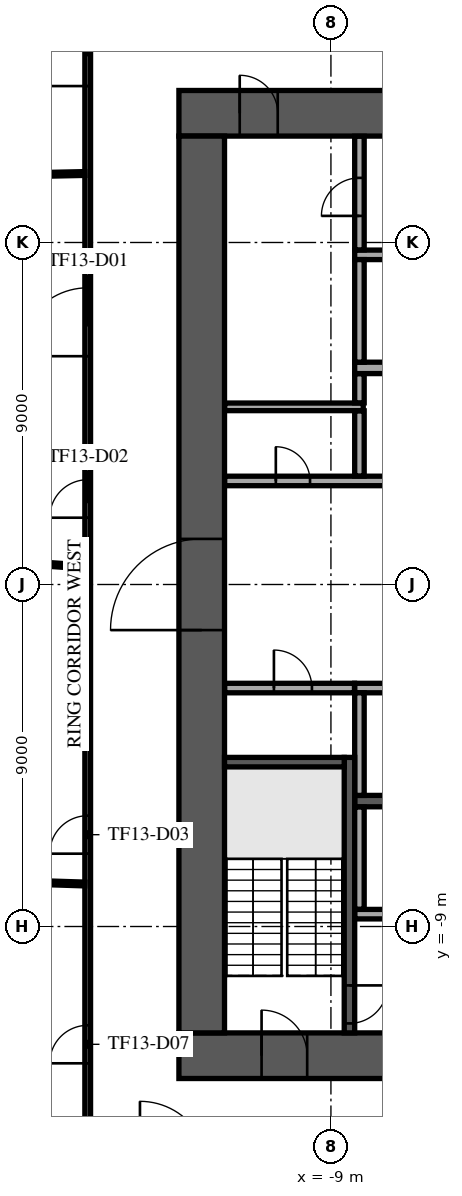
"""IFC4 building model, lengths in metres.
Left out: names, types, materials, properties, quantities, classifications, styles, units other than length and angle.
Written with IfcOpenShell. Run it as: python <this file> out.ifc"""

import sys

from ifc_helpers import new_model, si_unit, direction, frame, frame_2d, origin, place, context, subcontext, project, spatial, rectangle, extrude, element, fill, save


model = new_model("IFC4")
c1 = context("Model", 3, precision=1e-05, world=origin(), true_north=direction((0.0, 1.0)))
c2 = subcontext(c1, "Body", "Model", "MODEL_VIEW")
j1 = project(units=[si_unit("LENGTHUNIT", "METRE"), si_unit("PLANEANGLEUNIT", "RADIAN")], contexts=[c1])
p1 = place(None, origin())
s1 = spatial("IfcSite", under=j1, at=p1, CompositionType="ELEMENT")
p2 = place(p1, origin())
s2 = spatial("IfcBuilding", under=s1, at=p2, CompositionType="ELEMENT")
p3 = place(p2, frame((0.0, 0.0, 59.7)))
s3 = spatial("IfcBuildingStorey", under=s2, at=p3, CompositionType="ELEMENT", Elevation=59.7)
p4 = place(p3, frame((-13.0, 12.4, 0.0), z_axis=(0.0, 0.0, 1.0), x_axis=(1.0, 0.0, 0.0)))
e1 = element("IfcWall", 1, at=p4, inside=s3, PredefinedType="SHEAR", context=c2, shape_type="SweptSolid", body=[
    extrude(rectangle(XDim=26.0, YDim=1.2, at=frame_2d((13.0, 0.0))), origin(), (0.0, 0.0, 1.0), 3.75),
])
p5 = place(p4, frame((11.8, 0.0, 0.0)))
e2 = element("IfcOpeningElement", 2, at=p5, cuts=e1, PredefinedType="OPENING", context=c2, shape_type="SweptSolid", body=[
    extrude(rectangle(XDim=2.4, YDim=2.4, at=frame_2d((1.2, 1.2))), frame((0.0, 0.61, 0.0), z_axis=(0.0, -1.0, 0.0), x_axis=(1.0, 0.0, 0.0)), (0.0, 0.0, 1.0), 1.22),
])
p6 = place(p4, frame((22.625, 0.0, 0.0)))
e3 = element("IfcOpeningElement", 3, at=p6, cuts=e1, PredefinedType="OPENING", context=c2, shape_type="SweptSolid", body=[
    extrude(rectangle(XDim=1.2, YDim=2.1, at=frame_2d((0.6, 1.05))), frame((0.0, 0.61, 0.0), z_axis=(0.0, -1.0, 0.0), x_axis=(1.0, 0.0, 0.0)), (0.0, 0.0, 1.0), 1.22),
])
p7 = place(p4, frame((1.6, 0.0, 0.0)))
e4 = element("IfcOpeningElement", 4, at=p7, cuts=e1, PredefinedType="OPENING", context=c2, shape_type="SweptSolid", body=[
    extrude(rectangle(XDim=1.0, YDim=2.1, at=frame_2d((0.5, 1.05))), frame((0.0, 0.61, 0.0), z_axis=(0.0, -1.0, 0.0), x_axis=(1.0, 0.0, 0.0)), (0.0, 0.0, 1.0), 1.22),
])
p8 = place(p3, frame((-13.0, -12.4, 0.0), z_axis=(0.0, 0.0, 1.0), x_axis=(1.0, 0.0, 0.0)))
e5 = element("IfcWall", 5, at=p8, inside=s3, PredefinedType="SHEAR", context=c2, shape_type="SweptSolid", body=[
    extrude(rectangle(XDim=26.0, YDim=1.2, at=frame_2d((13.0, 0.0))), origin(), (0.0, 0.0, 1.0), 3.75),
])
p9 = place(p8, frame((7.9, 0.0, 0.0)))
e6 = element("IfcOpeningElement", 6, at=p9, cuts=e5, PredefinedType="OPENING", context=c2, shape_type="SweptSolid", body=[
    extrude(rectangle(XDim=2.0, YDim=2.1, at=frame_2d((1.0, 1.05))), frame((0.0, 0.61, 0.0), z_axis=(0.0, -1.0, 0.0), x_axis=(1.0, 0.0, 0.0)), (0.0, 0.0, 1.0), 1.22),
])
p10 = place(p8, frame((18.025, 0.0, 0.0)))
e7 = element("IfcOpeningElement", 7, at=p10, cuts=e5, PredefinedType="OPENING", context=c2, shape_type="SweptSolid", body=[
    extrude(rectangle(XDim=1.2, YDim=2.1, at=frame_2d((0.6, 1.05))), frame((0.0, 0.61, 0.0), z_axis=(0.0, -1.0, 0.0), x_axis=(1.0, 0.0, 0.0)), (0.0, 0.0, 1.0), 1.22),
])
p11 = place(p8, frame((2.175, 0.0, 0.0)))
e8 = element("IfcOpeningElement", 8, at=p11, cuts=e5, PredefinedType="OPENING", context=c2, shape_type="SweptSolid", body=[
    extrude(rectangle(XDim=1.2, YDim=2.1, at=frame_2d((0.6, 1.05))), frame((0.0, 0.61, 0.0), z_axis=(0.0, -1.0, 0.0), x_axis=(1.0, 0.0, 0.0)), (0.0, 0.0, 1.0), 1.22),
])
p12 = place(p8, frame((22.625, 0.0, 0.0)))
e9 = element("IfcOpeningElement", 9, at=p12, cuts=e5, PredefinedType="OPENING", context=c2, shape_type="SweptSolid", body=[
    extrude(rectangle(XDim=1.2, YDim=2.1, at=frame_2d((0.6, 1.05))), frame((0.0, 0.61, 0.0), z_axis=(0.0, -1.0, 0.0), x_axis=(1.0, 0.0, 0.0)), (0.0, 0.0, 1.0), 1.22),
])
p13 = place(p3, frame((-12.4, -11.8, 0.0), z_axis=(0.0, 0.0, 1.0), x_axis=(0.0, 1.0, 0.0)))
e10 = element("IfcWall", 10, at=p13, inside=s3, PredefinedType="SHEAR", context=c2, shape_type="SweptSolid", body=[
    extrude(rectangle(XDim=23.6, YDim=1.2, at=frame_2d((11.8, 0.0))), origin(), (0.0, 0.0, 1.0), 3.75),
])
p14 = place(p13, frame((10.6, 0.0, 0.0)))
e11 = element("IfcOpeningElement", 11, at=p14, cuts=e10, PredefinedType="OPENING", context=c2, shape_type="SweptSolid", body=[
    extrude(rectangle(XDim=2.4, YDim=2.4, at=frame_2d((1.2, 1.2))), frame((0.0, 0.61, 0.0), z_axis=(0.0, -1.0, 0.0), x_axis=(1.0, 0.0, 0.0)), (0.0, 0.0, 1.0), 1.22),
])
for number, where, z_axis, x_axis in (
    (12, (-8.375, 5.7, 0.0), (0.0, 0.0, 1.0), (1.0, 0.0, 0.0)),
    (13, (-8.375, -5.7, 0.0), (0.0, 0.0, 1.0), (1.0, 0.0, 0.0)),
):
    element("IfcWall", number, at=place(p3, frame(where, z_axis=z_axis, x_axis=x_axis)), inside=s3, PredefinedType="SOLIDWALL", context=c2, shape_type="SweptSolid", body=[
        extrude(rectangle(XDim=16.75, YDim=0.3, at=frame_2d((8.375, 0.0))), origin(), (0.0, 0.0, 1.0), 3.75),
    ])
p15 = place(p3, frame((-8.375, 8.675, 0.0), z_axis=(0.0, 0.0, 1.0), x_axis=(1.0, 0.0, 0.0)))
e14 = element("IfcWall", 14, at=p15, inside=s3, PredefinedType="SOLIDWALL", context=c2, shape_type="SweptSolid", body=[
    extrude(rectangle(XDim=16.75, YDim=0.25, at=frame_2d((8.375, 0.0))), origin(), (0.0, 0.0, 1.0), 3.75),
])
p16 = place(p15, frame((0.9, 0.0, 0.0)))
e15 = element("IfcOpeningElement", 15, at=p16, cuts=e14, PredefinedType="OPENING", context=c2, shape_type="SweptSolid", body=[
    extrude(rectangle(XDim=1.2, YDim=2.1, at=frame_2d((0.6, 1.05))), frame((0.0, 0.135, 0.0), z_axis=(0.0, -1.0, 0.0), x_axis=(1.0, 0.0, 0.0)), (0.0, 0.0, 1.0), 0.27),
])
p17 = place(p15, frame((3.65, 0.0, 0.0)))
e16 = element("IfcOpeningElement", 16, at=p17, cuts=e14, PredefinedType="OPENING", context=c2, shape_type="SweptSolid", body=[
    extrude(rectangle(XDim=1.2, YDim=2.1, at=frame_2d((0.6, 1.05))), frame((0.0, 0.135, 0.0), z_axis=(0.0, -1.0, 0.0), x_axis=(1.0, 0.0, 0.0)), (0.0, 0.0, 1.0), 0.27),
])
p18 = place(p15, frame((6.4, 0.0, 0.0)))
e17 = element("IfcOpeningElement", 17, at=p18, cuts=e14, PredefinedType="OPENING", context=c2, shape_type="SweptSolid", body=[
    extrude(rectangle(XDim=1.2, YDim=2.1, at=frame_2d((0.6, 1.05))), frame((0.0, 0.135, 0.0), z_axis=(0.0, -1.0, 0.0), x_axis=(1.0, 0.0, 0.0)), (0.0, 0.0, 1.0), 0.27),
])
p19 = place(p15, frame((9.15, 0.0, 0.0)))
e18 = element("IfcOpeningElement", 18, at=p19, cuts=e14, PredefinedType="OPENING", context=c2, shape_type="SweptSolid", body=[
    extrude(rectangle(XDim=1.2, YDim=2.1, at=frame_2d((0.6, 1.05))), frame((0.0, 0.135, 0.0), z_axis=(0.0, -1.0, 0.0), x_axis=(1.0, 0.0, 0.0)), (0.0, 0.0, 1.0), 0.27),
])
p20 = place(p15, frame((11.9, 0.0, 0.0)))
e19 = element("IfcOpeningElement", 19, at=p20, cuts=e14, PredefinedType="OPENING", context=c2, shape_type="SweptSolid", body=[
    extrude(rectangle(XDim=1.2, YDim=2.1, at=frame_2d((0.6, 1.05))), frame((0.0, 0.135, 0.0), z_axis=(0.0, -1.0, 0.0), x_axis=(1.0, 0.0, 0.0)), (0.0, 0.0, 1.0), 0.27),
])
p21 = place(p15, frame((14.65, 0.0, 0.0)))
e20 = element("IfcOpeningElement", 20, at=p21, cuts=e14, PredefinedType="OPENING", context=c2, shape_type="SweptSolid", body=[
    extrude(rectangle(XDim=1.2, YDim=2.1, at=frame_2d((0.6, 1.05))), frame((0.0, 0.135, 0.0), z_axis=(0.0, -1.0, 0.0), x_axis=(1.0, 0.0, 0.0)), (0.0, 0.0, 1.0), 0.27),
])
p22 = place(p3, frame((-8.25, 5.85, 0.0), z_axis=(0.0, 0.0, 1.0), x_axis=(0.0, 1.0, 0.0)))
e21 = element("IfcWall", 21, at=p22, inside=s3, PredefinedType="SOLIDWALL", context=c2, shape_type="SweptSolid", body=[
    extrude(rectangle(XDim=2.7, YDim=0.25, at=frame_2d((1.35, 0.0))), origin(), (0.0, 0.0, 1.0), 3.75),
])
p23 = place(p3, frame((-8.375, -2.725, 0.0), z_axis=(0.0, 0.0, 1.0), x_axis=(1.0, 0.0, 0.0)))
e22 = element("IfcWall", 22, at=p23, inside=s3, PredefinedType="SOLIDWALL", context=c2, shape_type="SweptSolid", body=[
    extrude(rectangle(XDim=14.0, YDim=0.25, at=frame_2d((7.0, 0.0))), origin(), (0.0, 0.0, 1.0), 3.75),
])
p24 = place(p3, frame((-8.25, -5.55, 0.0), z_axis=(0.0, 0.0, 1.0), x_axis=(0.0, 1.0, 0.0)))
e23 = element("IfcWall", 23, at=p24, inside=s3, PredefinedType="SOLIDWALL", context=c2, shape_type="SweptSolid", body=[
    extrude(rectangle(XDim=2.7, YDim=0.25, at=frame_2d((1.35, 0.0))), origin(), (0.0, 0.0, 1.0), 3.75),
])
p25 = place(p3, frame((-8.512, -4.55, 0.0), z_axis=(0.0, 0.0, 1.0), x_axis=(0.0, -1.0, 0.0)))
e24 = element("IfcWall", 24, at=p25, inside=s3, PredefinedType="SOLIDWALL", context=c2, shape_type="SweptSolid", body=[
    extrude(rectangle(XDim=7.25, YDim=0.275, at=frame_2d((3.625, 0.0))), origin(), (0.0, 0.0, 1.0), 3.75),
])
p26 = place(p25, frame((6.0, 0.0, 0.0)))
e25 = element("IfcOpeningElement", 25, at=p26, cuts=e24, PredefinedType="OPENING", context=c2, shape_type="SweptSolid", body=[
    extrude(rectangle(XDim=1.0, YDim=2.1, at=frame_2d((0.5, 1.05))), frame((0.0, 0.147, 0.0), z_axis=(0.0, -1.0, 0.0), x_axis=(1.0, 0.0, 0.0)), (0.0, 0.0, 1.0), 0.295),
])
p27 = place(p3, frame((-8.65, -4.675, 0.0), z_axis=(0.0, 0.0, 1.0), x_axis=(-1.0, 0.0, 0.0)))
e26 = element("IfcWall", 26, at=p27, inside=s3, PredefinedType="SOLIDWALL", context=c2, shape_type="SweptSolid", body=[
    extrude(rectangle(XDim=3.15, YDim=0.25, at=frame_2d((1.575, 0.0))), origin(), (0.0, 0.0, 1.0), 3.75),
])
p28 = place(p3, frame((-8.37, -8.675, 0.0), z_axis=(0.0, 0.0, 1.0), x_axis=(1.0, 0.0, 0.0)))
e27 = element("IfcWall", 27, at=p28, inside=s3, PredefinedType="PARTITIONING", context=c2, shape_type="SweptSolid", body=[
    extrude(rectangle(XDim=5.49, YDim=0.25, at=frame_2d((2.745, 0.0))), origin(), (0.0, 0.0, 1.0), 3.75),
])
p29 = place(p28, frame((0.995, 0.0, 0.0)))
e28 = element("IfcOpeningElement", 28, at=p29, cuts=e27, PredefinedType="OPENING", context=c2, shape_type="SweptSolid", body=[
    extrude(rectangle(XDim=1.0, YDim=2.1, at=frame_2d((0.5, 1.05))), frame((0.0, 0.135, 0.0), z_axis=(0.0, -1.0, 0.0), x_axis=(1.0, 0.0, 0.0)), (0.0, 0.0, 1.0), 0.27),
])
p30 = place(p28, frame((3.745, 0.0, 0.0)))
e29 = element("IfcOpeningElement", 29, at=p30, cuts=e27, PredefinedType="OPENING", context=c2, shape_type="SweptSolid", body=[
    extrude(rectangle(XDim=1.0, YDim=2.1, at=frame_2d((0.5, 1.05))), frame((0.0, 0.135, 0.0), z_axis=(0.0, -1.0, 0.0), x_axis=(1.0, 0.0, 0.0)), (0.0, 0.0, 1.0), 0.27),
])
p31 = place(p3, frame((-8.25, -8.545, 0.0), z_axis=(0.0, 0.0, 1.0), x_axis=(0.0, 1.0, 0.0)))
e30 = element("IfcWall", 30, at=p31, inside=s3, PredefinedType="PARTITIONING", context=c2, shape_type="SweptSolid", body=[
    extrude(rectangle(XDim=2.69, YDim=0.25, at=frame_2d((1.345, 0.0))), origin(), (0.0, 0.0, 1.0), 3.75),
])
p32 = place(p3, frame((-11.795, -2.725, 0.0), z_axis=(0.0, 0.0, 1.0), x_axis=(1.0, 0.0, 0.0)))
e31 = element("IfcWall", 31, at=p32, inside=s3, PredefinedType="PARTITIONING", context=c2, shape_type="SweptSolid", body=[
    extrude(rectangle(XDim=3.415, YDim=0.25, at=frame_2d((1.708, 0.0))), origin(), (0.0, 0.0, 1.0), 3.75),
])
p33 = place(p32, frame((1.295, 0.0, 0.0)))
e32 = element("IfcOpeningElement", 32, at=p33, cuts=e31, PredefinedType="OPENING", context=c2, shape_type="SweptSolid", body=[
    extrude(rectangle(XDim=1.0, YDim=2.1, at=frame_2d((0.5, 1.05))), frame((0.0, 0.135, 0.0), z_axis=(0.0, -1.0, 0.0), x_axis=(1.0, 0.0, 0.0)), (0.0, 0.0, 1.0), 0.27),
])
p34 = place(p3, frame((-11.795, 2.725, 0.0), z_axis=(0.0, 0.0, 1.0), x_axis=(1.0, 0.0, 0.0)))
e33 = element("IfcWall", 33, at=p34, inside=s3, PredefinedType="PARTITIONING", context=c2, shape_type="SweptSolid", body=[
    extrude(rectangle(XDim=23.59, YDim=0.25, at=frame_2d((11.795, 0.0))), origin(), (0.0, 0.0, 1.0), 3.75),
])
p35 = place(p34, frame((21.345, 0.0, 0.0)))
e34 = element("IfcOpeningElement", 34, at=p35, cuts=e33, PredefinedType="OPENING", context=c2, shape_type="SweptSolid", body=[
    extrude(rectangle(XDim=0.9, YDim=2.1, at=frame_2d((0.45, 1.05))), frame((0.0, 0.135, 0.0), z_axis=(0.0, -1.0, 0.0), x_axis=(1.0, 0.0, 0.0)), (0.0, 0.0, 1.0), 0.27),
])
p36 = place(p34, frame((1.345, 0.0, 0.0)))
e35 = element("IfcOpeningElement", 35, at=p36, cuts=e33, PredefinedType="OPENING", context=c2, shape_type="SweptSolid", body=[
    extrude(rectangle(XDim=0.9, YDim=2.1, at=frame_2d((0.45, 1.05))), frame((0.0, 0.135, 0.0), z_axis=(0.0, -1.0, 0.0), x_axis=(1.0, 0.0, 0.0)), (0.0, 0.0, 1.0), 0.27),
])
p37 = place(p34, frame((4.32, 0.0, 0.0)))
e36 = element("IfcOpeningElement", 36, at=p37, cuts=e33, PredefinedType="OPENING", context=c2, shape_type="SweptSolid", body=[
    extrude(rectangle(XDim=1.2, YDim=2.1, at=frame_2d((0.6, 1.05))), frame((0.0, 0.135, 0.0), z_axis=(0.0, -1.0, 0.0), x_axis=(1.0, 0.0, 0.0)), (0.0, 0.0, 1.0), 0.27),
])
p38 = place(p34, frame((15.42, 0.0, 0.0)))
e37 = element("IfcOpeningElement", 37, at=p38, cuts=e33, PredefinedType="OPENING", context=c2, shape_type="SweptSolid", body=[
    extrude(rectangle(XDim=1.0, YDim=2.1, at=frame_2d((0.5, 1.05))), frame((0.0, 0.135, 0.0), z_axis=(0.0, -1.0, 0.0), x_axis=(1.0, 0.0, 0.0)), (0.0, 0.0, 1.0), 0.27),
])
p39 = place(p3, frame((-8.25, 2.855, 0.0), z_axis=(0.0, 0.0, 1.0), x_axis=(0.0, 1.0, 0.0)))
e38 = element("IfcWall", 38, at=p39, inside=s3, PredefinedType="PARTITIONING", context=c2, shape_type="SweptSolid", body=[
    extrude(rectangle(XDim=1.715, YDim=0.25, at=frame_2d((0.857, 0.0))), origin(), (0.0, 0.0, 1.0), 3.75),
])
p40 = place(p3, frame((-11.795, 4.675, 0.0), z_axis=(0.0, 0.0, 1.0), x_axis=(1.0, 0.0, 0.0)))
e39 = element("IfcWall", 39, at=p40, inside=s3, PredefinedType="PARTITIONING", context=c2, shape_type="SweptSolid", body=[
    extrude(rectangle(XDim=3.645, YDim=0.2, at=frame_2d((1.823, 0.0))), origin(), (0.0, 0.0, 1.0), 3.75),
])
p41 = place(p3, frame((-8.25, 4.78, 0.0), z_axis=(0.0, 0.0, 1.0), x_axis=(0.0, 1.0, 0.0)))
e40 = element("IfcWall", 40, at=p41, inside=s3, PredefinedType="PARTITIONING", context=c2, shape_type="SweptSolid", body=[
    extrude(rectangle(XDim=0.765, YDim=0.25, at=frame_2d((0.382, 0.0))), origin(), (0.0, 0.0, 1.0), 3.75),
])
p42 = place(p3, frame((-8.25, 8.805, 0.0), z_axis=(0.0, 0.0, 1.0), x_axis=(0.0, 1.0, 0.0)))
e41 = element("IfcWall", 41, at=p42, inside=s3, PredefinedType="PARTITIONING", context=c2, shape_type="SweptSolid", body=[
    extrude(rectangle(XDim=2.99, YDim=0.25, at=frame_2d((1.495, 0.0))), origin(), (0.0, 0.0, 1.0), 3.75),
])
p43 = place(p42, frame((0.895, 0.0, 0.0)))
e42 = element("IfcOpeningElement", 42, at=p43, cuts=e41, PredefinedType="OPENING", context=c2, shape_type="SweptSolid", body=[
    extrude(rectangle(XDim=1.0, YDim=2.1, at=frame_2d((0.5, 1.05))), frame((0.0, 0.135, 0.0), z_axis=(0.0, -1.0, 0.0), x_axis=(1.0, 0.0, 0.0)), (0.0, 0.0, 1.0), 0.27),
])
p44 = place(p3, frame((-15.4, -15.4, 0.0), z_axis=(0.0, 0.0, 1.0), x_axis=(0.0, 1.0, 0.0)))
e43 = element("IfcWall", 43, at=p44, inside=s3, PredefinedType="PARTITIONING", context=c2, shape_type="SweptSolid", body=[
    extrude(rectangle(XDim=30.8, YDim=0.15, at=frame_2d((15.4, 0.0))), origin(), (0.0, 0.0, 1.0), 3.25),
])
p45 = place(p44, frame((21.408, 0.0, 0.0)))
e44 = element("IfcOpeningElement", 44, at=p45, cuts=e43, PredefinedType="OPENING", context=c2, shape_type="SweptSolid", body=[
    extrude(rectangle(XDim=1.8, YDim=2.1, at=frame_2d((0.9, 1.05))), frame((0.0, 0.085, 0.0), z_axis=(0.0, -1.0, 0.0), x_axis=(1.0, 0.0, 0.0)), (0.0, 0.0, 1.0), 0.17),
])
p46 = place(p44, frame((17.158, 0.0, 0.0)))
e45 = element("IfcOpeningElement", 45, at=p46, cuts=e43, PredefinedType="OPENING", context=c2, shape_type="SweptSolid", body=[
    extrude(rectangle(XDim=1.0, YDim=2.1, at=frame_2d((0.5, 1.05))), frame((0.0, 0.085, 0.0), z_axis=(0.0, -1.0, 0.0), x_axis=(1.0, 0.0, 0.0)), (0.0, 0.0, 1.0), 0.17),
])
p47 = place(p44, frame((8.316, 0.0, 0.0)))
e46 = element("IfcOpeningElement", 46, at=p47, cuts=e43, PredefinedType="OPENING", context=c2, shape_type="SweptSolid", body=[
    extrude(rectangle(XDim=1.0, YDim=2.1, at=frame_2d((0.5, 1.05))), frame((0.0, 0.085, 0.0), z_axis=(0.0, -1.0, 0.0), x_axis=(1.0, 0.0, 0.0)), (0.0, 0.0, 1.0), 0.17),
])
p48 = place(p44, frame((28.516, 0.0, 0.0)))
e47 = element("IfcOpeningElement", 47, at=p48, cuts=e43, PredefinedType="OPENING", context=c2, shape_type="SweptSolid", body=[
    extrude(rectangle(XDim=1.8, YDim=2.1, at=frame_2d((0.9, 1.05))), frame((0.0, 0.085, 0.0), z_axis=(0.0, -1.0, 0.0), x_axis=(1.0, 0.0, 0.0)), (0.0, 0.0, 1.0), 0.17),
])
p49 = place(p44, frame((2.8, 0.0, 0.0)))
e48 = element("IfcOpeningElement", 48, at=p49, cuts=e43, PredefinedType="OPENING", context=c2, shape_type="SweptSolid", body=[
    extrude(rectangle(XDim=1.0, YDim=2.1, at=frame_2d((0.5, 1.05))), frame((0.0, 0.085, 0.0), z_axis=(0.0, -1.0, 0.0), x_axis=(1.0, 0.0, 0.0)), (0.0, 0.0, 1.0), 0.17),
])
p50 = place(p3, frame((-30.11, 1.464, 0.0), z_axis=(0.0, 0.0, 1.0), x_axis=(0.997671325377, -0.068205032957, 0.0)))
e49 = element("IfcWall", 49, at=p50, inside=s3, PredefinedType="PARTITIONING", context=c2, shape_type="SweptSolid", body=[
    extrude(rectangle(XDim=14.665, YDim=0.1, at=frame_2d((7.333, 0.0))), origin(), (0.0, 0.0, 1.0), 2.95),
])
p51 = place(p3, frame((-28.535, -7.467, 0.0), z_axis=(0.0, 0.0, 1.0), x_axis=(0.999495289336, -0.031767382577, 0.0)))
e50 = element("IfcWall", 50, at=p51, inside=s3, PredefinedType="PARTITIONING", context=c2, shape_type="SweptSolid", body=[
    extrude(rectangle(XDim=13.065, YDim=0.1, at=frame_2d((6.532, 0.0))), origin(), (0.0, 0.0, 1.0), 2.95),
])
p52 = place(p3, frame((-28.517, 10.539, 0.0), z_axis=(0.0, 0.0, 1.0), x_axis=(0.999774736742, 0.02122441454, 0.0)))
e51 = element("IfcWall", 51, at=p52, inside=s3, PredefinedType="PARTITIONING", context=c2, shape_type="SweptSolid", body=[
    extrude(rectangle(XDim=13.044, YDim=0.1, at=frame_2d((6.522, 0.0))), origin(), (0.0, 0.0, 1.0), 3.25),
])
p53 = place(p7, origin())
e52 = element("IfcDoor", 52, at=p53, inside=s3, OperationType="SINGLE_SWING_LEFT", PredefinedType="DOOR", context=c2, shape_type="SweptSolid", body=[
    extrude(rectangle(XDim=1.0, YDim=2.1, at=frame_2d((0.5, 1.05))), frame((0.0, 0.025, 0.0), z_axis=(0.0, -1.0, 0.0), x_axis=(1.0, 0.0, 0.0)), (0.0, 0.0, 1.0), 0.05),
])
fill(e4, e52)
p54 = place(p11, origin())
e53 = element("IfcDoor", 53, at=p54, inside=s3, OperationType="SINGLE_SWING_LEFT", PredefinedType="DOOR", context=c2, shape_type="SweptSolid", body=[
    extrude(rectangle(XDim=1.2, YDim=2.1, at=frame_2d((0.6, 1.05))), frame((0.0, 0.025, 0.0), z_axis=(0.0, -1.0, 0.0), x_axis=(1.0, 0.0, 0.0)), (0.0, 0.0, 1.0), 0.05),
])
fill(e8, e53)
p55 = place(p14, origin())
e54 = element("IfcDoor", 54, at=p55, inside=s3, OperationType="SINGLE_SWING_LEFT", PredefinedType="DOOR", context=c2, shape_type="SweptSolid", body=[
    extrude(rectangle(XDim=2.4, YDim=2.4, at=frame_2d((1.2, 1.2))), frame((0.0, 0.025, 0.0), z_axis=(0.0, -1.0, 0.0), x_axis=(1.0, 0.0, 0.0)), (0.0, 0.0, 1.0), 0.05),
])
fill(e11, e54)
p56 = place(p26, origin())
e55 = element("IfcDoor", 55, at=p56, inside=s3, OperationType="SINGLE_SWING_LEFT", PredefinedType="DOOR", context=c2, shape_type="SweptSolid", body=[
    extrude(rectangle(XDim=1.0, YDim=2.1, at=frame_2d((0.5, 1.05))), frame((0.0, 0.025, 0.0), z_axis=(0.0, -1.0, 0.0), x_axis=(1.0, 0.0, 0.0)), (0.0, 0.0, 1.0), 0.05),
])
fill(e25, e55)
p57 = place(p33, origin())
e56 = element("IfcDoor", 56, at=p57, inside=s3, OperationType="SINGLE_SWING_RIGHT", PredefinedType="DOOR", context=c2, shape_type="SweptSolid", body=[
    extrude(rectangle(XDim=1.0, YDim=2.1, at=frame_2d((0.5, 1.05))), frame((0.0, 0.025, 0.0), z_axis=(0.0, -1.0, 0.0), x_axis=(1.0, 0.0, 0.0)), (0.0, 0.0, 1.0), 0.05),
])
fill(e32, e56)
p58 = place(p36, origin())
e57 = element("IfcDoor", 57, at=p58, inside=s3, OperationType="SINGLE_SWING_RIGHT", PredefinedType="DOOR", context=c2, shape_type="SweptSolid", body=[
    extrude(rectangle(XDim=0.9, YDim=2.1, at=frame_2d((0.45, 1.05))), frame((0.0, 0.025, 0.0), z_axis=(0.0, -1.0, 0.0), x_axis=(1.0, 0.0, 0.0)), (0.0, 0.0, 1.0), 0.05),
])
fill(e35, e57)
p59 = place(p43, origin())
e58 = element("IfcDoor", 58, at=p59, inside=s3, OperationType="SINGLE_SWING_RIGHT", PredefinedType="DOOR", context=c2, shape_type="SweptSolid", body=[
    extrude(rectangle(XDim=1.0, YDim=2.1, at=frame_2d((0.5, 1.05))), frame((0.0, 0.025, 0.0), z_axis=(0.0, -1.0, 0.0), x_axis=(1.0, 0.0, 0.0)), (0.0, 0.0, 1.0), 0.05),
])
fill(e42, e58)
p60 = place(p45, origin())
e59 = element("IfcDoor", 59, at=p60, inside=s3, OperationType="DOUBLE_DOOR_SINGLE_SWING", PredefinedType="DOOR", context=c2, shape_type="SweptSolid", body=[
    extrude(rectangle(XDim=1.8, YDim=2.1, at=frame_2d((0.9, 1.05))), frame((0.0, 0.025, 0.0), z_axis=(0.0, -1.0, 0.0), x_axis=(1.0, 0.0, 0.0)), (0.0, 0.0, 1.0), 0.05),
])
fill(e44, e59)
p61 = place(p46, origin())
e60 = element("IfcDoor", 60, at=p61, inside=s3, OperationType="SINGLE_SWING_LEFT", PredefinedType="DOOR", context=c2, shape_type="SweptSolid", body=[
    extrude(rectangle(XDim=1.0, YDim=2.1, at=frame_2d((0.5, 1.05))), frame((0.0, 0.025, 0.0), z_axis=(0.0, -1.0, 0.0), x_axis=(1.0, 0.0, 0.0)), (0.0, 0.0, 1.0), 0.05),
])
fill(e45, e60)
p62 = place(p47, origin())
e61 = element("IfcDoor", 61, at=p62, inside=s3, OperationType="SINGLE_SWING_RIGHT", PredefinedType="DOOR", context=c2, shape_type="SweptSolid", body=[
    extrude(rectangle(XDim=1.0, YDim=2.1, at=frame_2d((0.5, 1.05))), frame((0.0, 0.025, 0.0), z_axis=(0.0, -1.0, 0.0), x_axis=(1.0, 0.0, 0.0)), (0.0, 0.0, 1.0), 0.05),
])
fill(e46, e61)
p63 = place(p48, origin())
e62 = element("IfcDoor", 62, at=p63, inside=s3, OperationType="DOUBLE_DOOR_SINGLE_SWING", PredefinedType="DOOR", context=c2, shape_type="SweptSolid", body=[
    extrude(rectangle(XDim=1.8, YDim=2.1, at=frame_2d((0.9, 1.05))), frame((0.0, 0.025, 0.0), z_axis=(0.0, -1.0, 0.0), x_axis=(1.0, 0.0, 0.0)), (0.0, 0.0, 1.0), 0.05),
])
fill(e47, e62)
p64 = place(p49, origin())
e63 = element("IfcDoor", 63, at=p64, inside=s3, OperationType="SINGLE_SWING_RIGHT", PredefinedType="DOOR", context=c2, shape_type="SweptSolid", body=[
    extrude(rectangle(XDim=1.0, YDim=2.1, at=frame_2d((0.5, 1.05))), frame((0.0, 0.025, 0.0), z_axis=(0.0, -1.0, 0.0), x_axis=(1.0, 0.0, 0.0)), (0.0, 0.0, 1.0), 0.05),
])
fill(e48, e63)
save(model, sys.argv[1])
